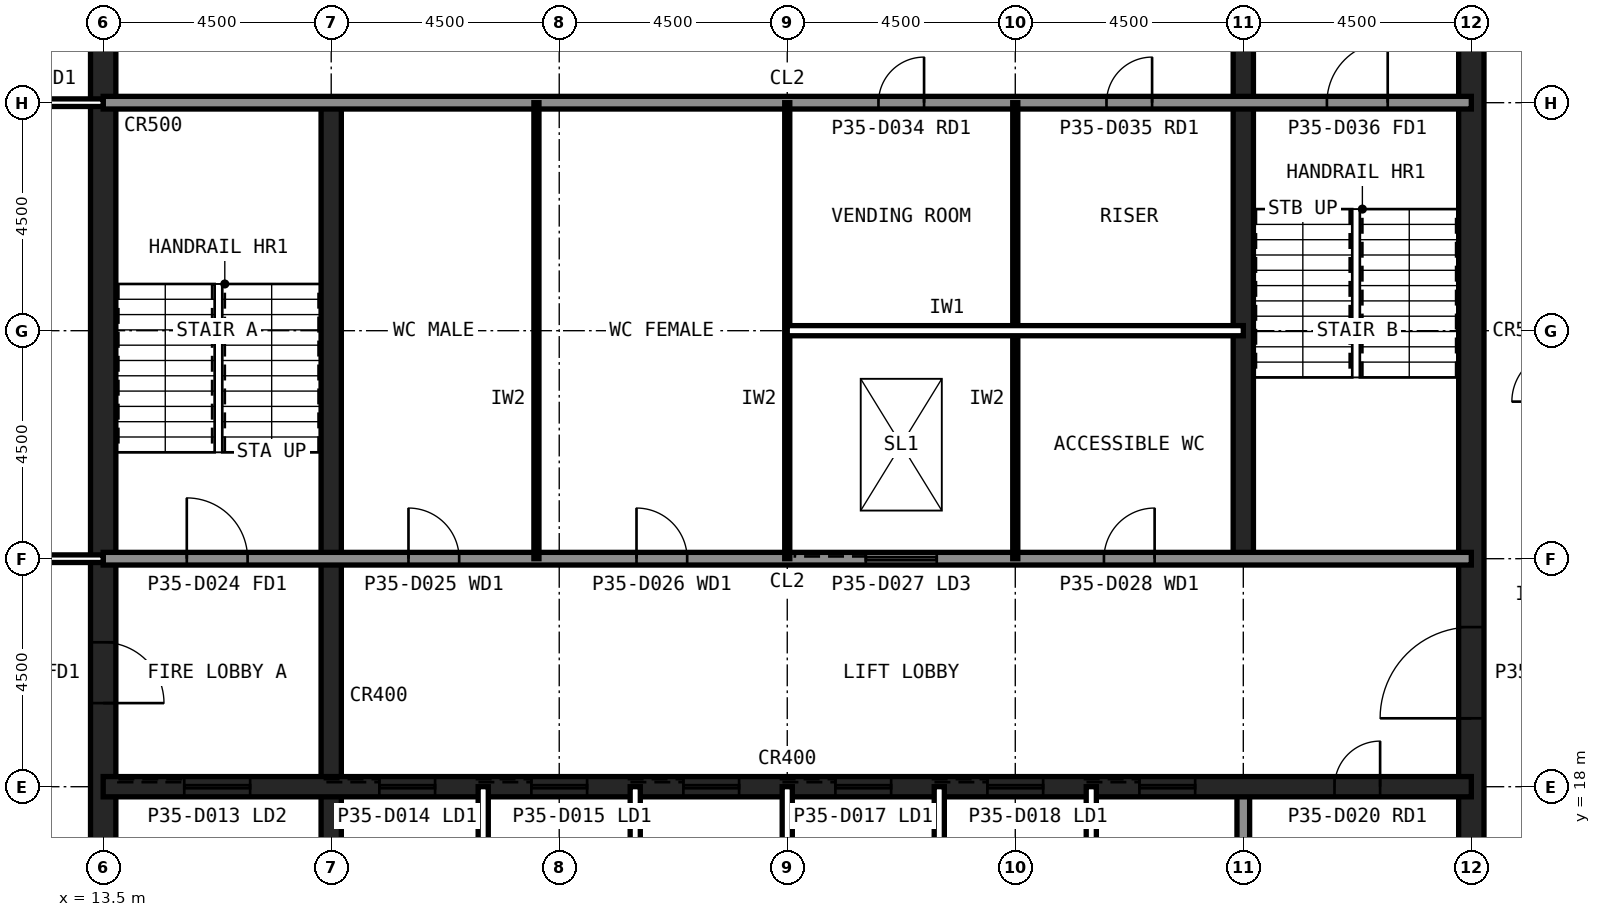
"""IFC4 building model, lengths in metres.
Left out: names, types, materials, properties, quantities, classifications, styles, units other than length and angle.
Written with IfcOpenShell. Run it as: python <this file> out.ifc"""

import sys

from ifc_helpers import new_model, si_unit, direction, frame, frame_2d, origin, place, context, subcontext, project, spatial, rectangle, extrude, element, fill, save


model = new_model("IFC4")
c1 = context("Model", 3, precision=1e-05, world=origin(), true_north=direction((0.0, 1.0)))
c2 = subcontext(c1, "Body", "Model", "MODEL_VIEW")
j1 = project(units=[si_unit("LENGTHUNIT", "METRE"), si_unit("PLANEANGLEUNIT", "RADIAN")], contexts=[c1])
p1 = place(None, origin())
s1 = spatial("IfcSite", under=j1, at=p1, CompositionType="ELEMENT")
p2 = place(p1, origin())
s2 = spatial("IfcBuilding", under=s1, at=p2, CompositionType="ELEMENT")
p3 = place(p2, frame((0.0, 0.0, 151.6)))
s3 = spatial("IfcBuildingStorey", under=s2, at=p3, CompositionType="ELEMENT", Elevation=151.6)
p4 = place(p3, frame((40.5, 13.5, 0.0), z_axis=(0.0, 0.0, 1.0), x_axis=(0.0, 1.0, 0.0)))
e1 = element("IfcWall", 1, at=p4, inside=s3, PredefinedType="SHEAR", context=c2, shape_type="SweptSolid", body=[
    extrude(rectangle(XDim=27.0, YDim=0.5, at=frame_2d((13.5, 0.0))), origin(), (0.0, 0.0, 1.0), 4.0),
])
p5 = place(p4, frame((5.85, 0.0, 0.0)))
e2 = element("IfcOpeningElement", 2, at=p5, cuts=e1, PredefinedType="OPENING", context=c2, shape_type="SweptSolid", body=[
    extrude(rectangle(XDim=1.8, YDim=2.1, at=frame_2d((0.9, 1.05))), frame((0.0, 0.26, 0.0), z_axis=(0.0, -1.0, 0.0), x_axis=(1.0, 0.0, 0.0)), (0.0, 0.0, 1.0), 0.52),
])
p6 = place(p4, frame((19.65, 0.0, 0.0)))
e3 = element("IfcOpeningElement", 3, at=p6, cuts=e1, PredefinedType="OPENING", context=c2, shape_type="SweptSolid", body=[
    extrude(rectangle(XDim=1.2, YDim=2.1, at=frame_2d((0.6, 1.05))), frame((0.0, 0.26, 0.0), z_axis=(0.0, -1.0, 0.0), x_axis=(1.0, 0.0, 0.0)), (0.0, 0.0, 1.0), 0.52),
])
p7 = place(p3, frame((13.5, 40.5, 0.0), z_axis=(0.0, 0.0, 1.0), x_axis=(0.0, -1.0, 0.0)))
e4 = element("IfcWall", 4, at=p7, inside=s3, PredefinedType="SHEAR", context=c2, shape_type="SweptSolid", body=[
    extrude(rectangle(XDim=27.0, YDim=0.5, at=frame_2d((13.5, 0.0))), origin(), (0.0, 0.0, 1.0), 4.0),
])
p8 = place(p7, frame((19.65, 0.0, 0.0)))
e5 = element("IfcOpeningElement", 5, at=p8, cuts=e4, PredefinedType="OPENING", context=c2, shape_type="SweptSolid", body=[
    extrude(rectangle(XDim=1.2, YDim=2.1, at=frame_2d((0.6, 1.05))), frame((0.0, 0.26, 0.0), z_axis=(0.0, -1.0, 0.0), x_axis=(1.0, 0.0, 0.0)), (0.0, 0.0, 1.0), 0.52),
])
p9 = place(p7, frame((5.85, 0.0, 0.0)))
e6 = element("IfcOpeningElement", 6, at=p9, cuts=e4, PredefinedType="OPENING", context=c2, shape_type="SweptSolid", body=[
    extrude(rectangle(XDim=1.8, YDim=2.1, at=frame_2d((0.9, 1.05))), frame((0.0, 0.26, 0.0), z_axis=(0.0, -1.0, 0.0), x_axis=(1.0, 0.0, 0.0)), (0.0, 0.0, 1.0), 0.52),
])
p10 = place(p3, frame((18.0, 13.5, 0.0), z_axis=(0.0, 0.0, 1.0), x_axis=(0.0, 1.0, 0.0)))
e7 = element("IfcWall", 7, at=p10, inside=s3, PredefinedType="SHEAR", context=c2, shape_type="SweptSolid", body=[
    extrude(rectangle(XDim=18.0, YDim=0.4, at=frame_2d((9.0, 0.0))), origin(), (0.0, 0.0, 1.0), 4.0),
])
p11 = place(p3, frame((36.0, 13.5, 0.0), z_axis=(0.0, 0.0, 1.0), x_axis=(0.0, 1.0, 0.0)))
e8 = element("IfcWall", 8, at=p11, inside=s3, PredefinedType="SOLIDWALL", context=c2, shape_type="SweptSolid", body=[
    extrude(rectangle(XDim=4.5, YDim=0.25, at=frame_2d((2.25, 0.0))), origin(), (0.0, 0.0, 1.0), 3.84),
])
p12 = place(p3, frame((36.0, 22.5, 0.0), z_axis=(0.0, 0.0, 1.0), x_axis=(0.0, 1.0, 0.0)))
e9 = element("IfcWall", 9, at=p12, inside=s3, PredefinedType="SHEAR", context=c2, shape_type="SweptSolid", body=[
    extrude(rectangle(XDim=18.0, YDim=0.4, at=frame_2d((9.0, 0.0))), origin(), (0.0, 0.0, 1.0), 4.0),
])
p13 = place(p3, frame((13.5, 18.0, 0.0), z_axis=(0.0, 0.0, 1.0), x_axis=(1.0, 0.0, 0.0)))
e10 = element("IfcWall", 10, at=p13, inside=s3, PredefinedType="SHEAR", context=c2, shape_type="SweptSolid", body=[
    extrude(rectangle(XDim=27.0, YDim=0.4, at=frame_2d((13.5, 0.0))), origin(), (0.0, 0.0, 1.0), 4.0),
])
p14 = place(p13, frame((24.3, 0.0, 0.0)))
e11 = element("IfcOpeningElement", 11, at=p14, cuts=e10, PredefinedType="OPENING", context=c2, shape_type="SweptSolid", body=[
    extrude(rectangle(XDim=0.9, YDim=2.1, at=frame_2d((0.45, 1.05))), frame((0.0, 0.21, 0.0), z_axis=(0.0, -1.0, 0.0), x_axis=(1.0, 0.0, 0.0)), (0.0, 0.0, 1.0), 0.42),
])
p15 = place(p13, frame((5.45, 0.0, 0.0)))
e12 = element("IfcOpeningElement", 12, at=p15, cuts=e10, PredefinedType="OPENING", context=c2, shape_type="SweptSolid", body=[
    extrude(rectangle(XDim=1.1, YDim=2.1, at=frame_2d((0.55, 1.05))), frame((0.0, 0.21, 0.0), z_axis=(0.0, -1.0, 0.0), x_axis=(1.0, 0.0, 0.0)), (0.0, 0.0, 1.0), 0.42),
])
p16 = place(p13, frame((8.45, 0.0, 0.0)))
e13 = element("IfcOpeningElement", 13, at=p16, cuts=e10, PredefinedType="OPENING", context=c2, shape_type="SweptSolid", body=[
    extrude(rectangle(XDim=1.1, YDim=2.1, at=frame_2d((0.55, 1.05))), frame((0.0, 0.21, 0.0), z_axis=(0.0, -1.0, 0.0), x_axis=(1.0, 0.0, 0.0)), (0.0, 0.0, 1.0), 0.42),
])
p17 = place(p13, frame((11.45, 0.0, 0.0)))
e14 = element("IfcOpeningElement", 14, at=p17, cuts=e10, PredefinedType="OPENING", context=c2, shape_type="SweptSolid", body=[
    extrude(rectangle(XDim=1.1, YDim=2.1, at=frame_2d((0.55, 1.05))), frame((0.0, 0.21, 0.0), z_axis=(0.0, -1.0, 0.0), x_axis=(1.0, 0.0, 0.0)), (0.0, 0.0, 1.0), 0.42),
])
p18 = place(p13, frame((14.45, 0.0, 0.0)))
e15 = element("IfcOpeningElement", 15, at=p18, cuts=e10, PredefinedType="OPENING", context=c2, shape_type="SweptSolid", body=[
    extrude(rectangle(XDim=1.1, YDim=2.1, at=frame_2d((0.55, 1.05))), frame((0.0, 0.21, 0.0), z_axis=(0.0, -1.0, 0.0), x_axis=(1.0, 0.0, 0.0)), (0.0, 0.0, 1.0), 0.42),
])
p19 = place(p13, frame((17.45, 0.0, 0.0)))
e16 = element("IfcOpeningElement", 16, at=p19, cuts=e10, PredefinedType="OPENING", context=c2, shape_type="SweptSolid", body=[
    extrude(rectangle(XDim=1.1, YDim=2.1, at=frame_2d((0.55, 1.05))), frame((0.0, 0.21, 0.0), z_axis=(0.0, -1.0, 0.0), x_axis=(1.0, 0.0, 0.0)), (0.0, 0.0, 1.0), 0.42),
])
p20 = place(p13, frame((20.45, 0.0, 0.0)))
e17 = element("IfcOpeningElement", 17, at=p20, cuts=e10, PredefinedType="OPENING", context=c2, shape_type="SweptSolid", body=[
    extrude(rectangle(XDim=1.1, YDim=2.1, at=frame_2d((0.55, 1.05))), frame((0.0, 0.21, 0.0), z_axis=(0.0, -1.0, 0.0), x_axis=(1.0, 0.0, 0.0)), (0.0, 0.0, 1.0), 0.42),
])
p21 = place(p13, frame((1.6, 0.0, 0.0)))
e18 = element("IfcOpeningElement", 18, at=p21, cuts=e10, PredefinedType="OPENING", context=c2, shape_type="SweptSolid", body=[
    extrude(rectangle(XDim=1.3, YDim=2.2, at=frame_2d((0.65, 1.1))), frame((0.0, 0.21, 0.0), z_axis=(0.0, -1.0, 0.0), x_axis=(1.0, 0.0, 0.0)), (0.0, 0.0, 1.0), 0.42),
])
p22 = place(p3, frame((13.5, 22.5, 0.0), z_axis=(0.0, 0.0, 1.0), x_axis=(1.0, 0.0, 0.0)))
e19 = element("IfcWall", 19, at=p22, inside=s3, PredefinedType="SOLIDWALL", context=c2, shape_type="SweptSolid", body=[
    extrude(rectangle(XDim=27.0, YDim=0.25, at=frame_2d((13.5, 0.0))), origin(), (0.0, 0.0, 1.0), 3.84),
])
p23 = place(p22, frame((1.65, 0.0, 0.0)))
e20 = element("IfcOpeningElement", 20, at=p23, cuts=e19, PredefinedType="OPENING", context=c2, shape_type="SweptSolid", body=[
    extrude(rectangle(XDim=1.2, YDim=2.1, at=frame_2d((0.6, 1.05))), frame((0.0, 0.135, 0.0), z_axis=(0.0, -1.0, 0.0), x_axis=(1.0, 0.0, 0.0)), (0.0, 0.0, 1.0), 0.27),
])
p24 = place(p22, frame((6.025, 0.0, 0.0)))
e21 = element("IfcOpeningElement", 21, at=p24, cuts=e19, PredefinedType="OPENING", context=c2, shape_type="SweptSolid", body=[
    extrude(rectangle(XDim=1.0, YDim=2.1, at=frame_2d((0.5, 1.05))), frame((0.0, 0.135, 0.0), z_axis=(0.0, -1.0, 0.0), x_axis=(1.0, 0.0, 0.0)), (0.0, 0.0, 1.0), 0.27),
])
p25 = place(p22, frame((10.525, 0.0, 0.0)))
e22 = element("IfcOpeningElement", 22, at=p25, cuts=e19, PredefinedType="OPENING", context=c2, shape_type="SweptSolid", body=[
    extrude(rectangle(XDim=1.0, YDim=2.1, at=frame_2d((0.5, 1.05))), frame((0.0, 0.135, 0.0), z_axis=(0.0, -1.0, 0.0), x_axis=(1.0, 0.0, 0.0)), (0.0, 0.0, 1.0), 0.27),
])
p26 = place(p22, frame((19.75, 0.0, 0.0)))
e23 = element("IfcOpeningElement", 23, at=p26, cuts=e19, PredefinedType="OPENING", context=c2, shape_type="SweptSolid", body=[
    extrude(rectangle(XDim=1.0, YDim=2.1, at=frame_2d((0.5, 1.05))), frame((0.0, 0.135, 0.0), z_axis=(0.0, -1.0, 0.0), x_axis=(1.0, 0.0, 0.0)), (0.0, 0.0, 1.0), 0.27),
])
p27 = place(p22, frame((15.05, 0.0, 0.0)))
e24 = element("IfcOpeningElement", 24, at=p27, cuts=e19, PredefinedType="OPENING", context=c2, shape_type="SweptSolid", body=[
    extrude(rectangle(XDim=1.4, YDim=2.4, at=frame_2d((0.7, 1.2))), frame((0.0, 0.135, 0.0), z_axis=(0.0, -1.0, 0.0), x_axis=(1.0, 0.0, 0.0)), (0.0, 0.0, 1.0), 0.27),
])
p28 = place(p3, frame((13.5, 31.5, 0.0), z_axis=(0.0, 0.0, 1.0), x_axis=(1.0, 0.0, 0.0)))
e25 = element("IfcWall", 25, at=p28, inside=s3, PredefinedType="SOLIDWALL", context=c2, shape_type="SweptSolid", body=[
    extrude(rectangle(XDim=27.0, YDim=0.25, at=frame_2d((13.5, 0.0))), origin(), (0.0, 0.0, 1.0), 3.84),
])
p29 = place(p28, frame((24.15, 0.0, 0.0)))
e26 = element("IfcOpeningElement", 26, at=p29, cuts=e25, PredefinedType="OPENING", context=c2, shape_type="SweptSolid", body=[
    extrude(rectangle(XDim=1.2, YDim=2.1, at=frame_2d((0.6, 1.05))), frame((0.0, 0.135, 0.0), z_axis=(0.0, -1.0, 0.0), x_axis=(1.0, 0.0, 0.0)), (0.0, 0.0, 1.0), 0.27),
])
p30 = place(p28, frame((15.3, 0.0, 0.0)))
e27 = element("IfcOpeningElement", 27, at=p30, cuts=e25, PredefinedType="OPENING", context=c2, shape_type="SweptSolid", body=[
    extrude(rectangle(XDim=0.9, YDim=2.1, at=frame_2d((0.45, 1.05))), frame((0.0, 0.135, 0.0), z_axis=(0.0, -1.0, 0.0), x_axis=(1.0, 0.0, 0.0)), (0.0, 0.0, 1.0), 0.27),
])
p31 = place(p28, frame((19.8, 0.0, 0.0)))
e28 = element("IfcOpeningElement", 28, at=p31, cuts=e25, PredefinedType="OPENING", context=c2, shape_type="SweptSolid", body=[
    extrude(rectangle(XDim=0.9, YDim=2.1, at=frame_2d((0.45, 1.05))), frame((0.0, 0.135, 0.0), z_axis=(0.0, -1.0, 0.0), x_axis=(1.0, 0.0, 0.0)), (0.0, 0.0, 1.0), 0.27),
])
for number, where, z_axis, x_axis in (
    (29, (21.0, 13.5, 0.0), (0.0, 0.0, 1.0), (0.0, 1.0, 0.0)),
    (30, (24.0, 13.5, 0.0), (0.0, 0.0, 1.0), (0.0, 1.0, 0.0)),
    (31, (27.0, 13.5, 0.0), (0.0, 0.0, 1.0), (0.0, 1.0, 0.0)),
    (32, (30.0, 13.5, 0.0), (0.0, 0.0, 1.0), (0.0, 1.0, 0.0)),
    (33, (33.0, 13.5, 0.0), (0.0, 0.0, 1.0), (0.0, 1.0, 0.0)),
):
    element("IfcWall", number, at=place(p3, frame(where, z_axis=z_axis, x_axis=x_axis)), inside=s3, PredefinedType="PARTITIONING", context=c2, shape_type="SweptSolid", body=[
        extrude(rectangle(XDim=4.5, YDim=0.2, at=frame_2d((2.25, 0.0))), origin(), (0.0, 0.0, 1.0), 3.84),
    ])
for number, where, z_axis, x_axis in (
    (34, (22.05, 22.5, 0.0), (0.0, 0.0, 1.0), (0.0, 1.0, 0.0)),
    (35, (27.0, 22.5, 0.0), (0.0, 0.0, 1.0), (0.0, 1.0, 0.0)),
    (36, (31.5, 22.5, 0.0), (0.0, 0.0, 1.0), (0.0, 1.0, 0.0)),
):
    element("IfcWall", number, at=place(p3, frame(where, z_axis=z_axis, x_axis=x_axis)), inside=s3, PredefinedType="PLUMBINGWALL", context=c2, shape_type="SweptSolid", body=[
        extrude(rectangle(XDim=9.0, YDim=0.1, at=frame_2d((4.5, 0.0))), origin(), (0.0, 0.0, 1.0), 3.84),
    ])
p32 = place(p3, frame((27.0, 27.0, 0.0), z_axis=(0.0, 0.0, 1.0), x_axis=(1.0, 0.0, 0.0)))
e37 = element("IfcWall", 37, at=p32, inside=s3, PredefinedType="PARTITIONING", context=c2, shape_type="SweptSolid", body=[
    extrude(rectangle(XDim=9.0, YDim=0.2, at=frame_2d((4.5, 0.0))), origin(), (0.0, 0.0, 1.0), 3.84),
])
p33 = place(p3, frame((9.9, 22.5, 0.0), z_axis=(0.0, 0.0, 1.0), x_axis=(1.0, 0.0, 0.0)))
e38 = element("IfcWall", 38, at=p33, inside=s3, PredefinedType="PARTITIONING", context=c2, shape_type="SweptSolid", body=[
    extrude(rectangle(XDim=3.6, YDim=0.15, at=frame_2d((1.8, 0.0))), origin(), (0.0, 0.0, 1.0), 2.989),
])
p34 = place(p3, frame((13.5, 31.5, 0.0), z_axis=(0.0, 0.0, 1.0), x_axis=(-1.0, 0.0, 0.0)))
e39 = element("IfcWall", 39, at=p34, inside=s3, PredefinedType="PARTITIONING", context=c2, shape_type="SweptSolid", body=[
    extrude(rectangle(XDim=3.6, YDim=0.15, at=frame_2d((1.8, 0.0))), origin(), (0.0, 0.0, 1.0), 2.989),
])
p35 = place(p34, frame((1.3, 0.0, 0.0)))
e40 = element("IfcOpeningElement", 40, at=p35, cuts=e39, PredefinedType="OPENING", context=c2, shape_type="SweptSolid", body=[
    extrude(rectangle(XDim=1.0, YDim=2.1, at=frame_2d((0.5, 1.05))), frame((0.0, 0.085, 0.0), z_axis=(0.0, -1.0, 0.0), x_axis=(1.0, 0.0, 0.0)), (0.0, 0.0, 1.0), 0.17),
])
p36 = place(p8, origin())
e41 = element("IfcDoor", 41, at=p36, inside=s3, OperationType="SINGLE_SWING_RIGHT", PredefinedType="DOOR", context=c2, shape_type="SweptSolid", body=[
    extrude(rectangle(XDim=1.2, YDim=2.1, at=frame_2d((0.6, 1.05))), frame((0.0, 0.025, 0.0), z_axis=(0.0, -1.0, 0.0), x_axis=(1.0, 0.0, 0.0)), (0.0, 0.0, 1.0), 0.05),
])
fill(e5, e41)
p37 = place(p5, origin())
e42 = element("IfcDoor", 42, at=p37, inside=s3, OperationType="SINGLE_SWING_LEFT", PredefinedType="DOOR", context=c2, shape_type="SweptSolid", body=[
    extrude(rectangle(XDim=1.8, YDim=2.1, at=frame_2d((0.9, 1.05))), frame((0.0, 0.025, 0.0), z_axis=(0.0, -1.0, 0.0), x_axis=(1.0, 0.0, 0.0)), (0.0, 0.0, 1.0), 0.05),
])
fill(e2, e42)
p38 = place(p23, origin())
e43 = element("IfcDoor", 43, at=p38, inside=s3, OperationType="SINGLE_SWING_LEFT", PredefinedType="DOOR", context=c2, shape_type="SweptSolid", body=[
    extrude(rectangle(XDim=1.2, YDim=2.1, at=frame_2d((0.6, 1.05))), frame((0.0, 0.025, 0.0), z_axis=(0.0, -1.0, 0.0), x_axis=(1.0, 0.0, 0.0)), (0.0, 0.0, 1.0), 0.05),
])
fill(e20, e43)
p39 = place(p29, origin())
e44 = element("IfcDoor", 44, at=p39, inside=s3, OperationType="SINGLE_SWING_RIGHT", PredefinedType="DOOR", context=c2, shape_type="SweptSolid", body=[
    extrude(rectangle(XDim=1.2, YDim=2.1, at=frame_2d((0.6, 1.05))), frame((0.0, 0.025, 0.0), z_axis=(0.0, -1.0, 0.0), x_axis=(1.0, 0.0, 0.0)), (0.0, 0.0, 1.0), 0.05),
])
fill(e26, e44)
p40 = place(p24, origin())
e45 = element("IfcDoor", 45, at=p40, inside=s3, OperationType="SINGLE_SWING_LEFT", PredefinedType="DOOR", context=c2, shape_type="SweptSolid", body=[
    extrude(rectangle(XDim=1.0, YDim=2.1, at=frame_2d((0.5, 1.05))), frame((0.0, 0.025, 0.0), z_axis=(0.0, -1.0, 0.0), x_axis=(1.0, 0.0, 0.0)), (0.0, 0.0, 1.0), 0.05),
])
fill(e21, e45)
p41 = place(p25, origin())
e46 = element("IfcDoor", 46, at=p41, inside=s3, OperationType="SINGLE_SWING_LEFT", PredefinedType="DOOR", context=c2, shape_type="SweptSolid", body=[
    extrude(rectangle(XDim=1.0, YDim=2.1, at=frame_2d((0.5, 1.05))), frame((0.0, 0.025, 0.0), z_axis=(0.0, -1.0, 0.0), x_axis=(1.0, 0.0, 0.0)), (0.0, 0.0, 1.0), 0.05),
])
fill(e22, e46)
p42 = place(p26, origin())
e47 = element("IfcDoor", 47, at=p42, inside=s3, OperationType="SINGLE_SWING_RIGHT", PredefinedType="DOOR", context=c2, shape_type="SweptSolid", body=[
    extrude(rectangle(XDim=1.0, YDim=2.1, at=frame_2d((0.5, 1.05))), frame((0.0, 0.025, 0.0), z_axis=(0.0, -1.0, 0.0), x_axis=(1.0, 0.0, 0.0)), (0.0, 0.0, 1.0), 0.05),
])
fill(e23, e47)
p43 = place(p30, origin())
e48 = element("IfcDoor", 48, at=p43, inside=s3, OperationType="SINGLE_SWING_RIGHT", PredefinedType="DOOR", context=c2, shape_type="SweptSolid", body=[
    extrude(rectangle(XDim=0.9, YDim=2.1, at=frame_2d((0.45, 1.05))), frame((0.0, 0.025, 0.0), z_axis=(0.0, -1.0, 0.0), x_axis=(1.0, 0.0, 0.0)), (0.0, 0.0, 1.0), 0.05),
])
fill(e27, e48)
p44 = place(p31, origin())
e49 = element("IfcDoor", 49, at=p44, inside=s3, OperationType="SINGLE_SWING_RIGHT", PredefinedType="DOOR", context=c2, shape_type="SweptSolid", body=[
    extrude(rectangle(XDim=0.9, YDim=2.1, at=frame_2d((0.45, 1.05))), frame((0.0, 0.025, 0.0), z_axis=(0.0, -1.0, 0.0), x_axis=(1.0, 0.0, 0.0)), (0.0, 0.0, 1.0), 0.05),
])
fill(e28, e49)
p45 = place(p14, origin())
e50 = element("IfcDoor", 50, at=p45, inside=s3, OperationType="SINGLE_SWING_RIGHT", PredefinedType="DOOR", context=c2, shape_type="SweptSolid", body=[
    extrude(rectangle(XDim=0.9, YDim=2.1, at=frame_2d((0.45, 1.05))), frame((0.0, 0.025, 0.0), z_axis=(0.0, -1.0, 0.0), x_axis=(1.0, 0.0, 0.0)), (0.0, 0.0, 1.0), 0.05),
])
fill(e11, e50)
p46 = place(p15, origin())
e51 = element("IfcDoor", 51, at=p46, inside=s3, OperationType="SLIDING_TO_LEFT", PredefinedType="DOOR", context=c2, shape_type="SweptSolid", body=[
    extrude(rectangle(XDim=1.1, YDim=2.1, at=frame_2d((0.55, 1.05))), frame((0.0, 0.025, 0.0), z_axis=(0.0, -1.0, 0.0), x_axis=(1.0, 0.0, 0.0)), (0.0, 0.0, 1.0), 0.05),
])
fill(e12, e51)
p47 = place(p16, origin())
e52 = element("IfcDoor", 52, at=p47, inside=s3, OperationType="SLIDING_TO_LEFT", PredefinedType="DOOR", context=c2, shape_type="SweptSolid", body=[
    extrude(rectangle(XDim=1.1, YDim=2.1, at=frame_2d((0.55, 1.05))), frame((0.0, 0.025, 0.0), z_axis=(0.0, -1.0, 0.0), x_axis=(1.0, 0.0, 0.0)), (0.0, 0.0, 1.0), 0.05),
])
fill(e13, e52)
p48 = place(p17, origin())
e53 = element("IfcDoor", 53, at=p48, inside=s3, OperationType="SLIDING_TO_LEFT", PredefinedType="DOOR", context=c2, shape_type="SweptSolid", body=[
    extrude(rectangle(XDim=1.1, YDim=2.1, at=frame_2d((0.55, 1.05))), frame((0.0, 0.025, 0.0), z_axis=(0.0, -1.0, 0.0), x_axis=(1.0, 0.0, 0.0)), (0.0, 0.0, 1.0), 0.05),
])
fill(e14, e53)
p49 = place(p18, origin())
e54 = element("IfcDoor", 54, at=p49, inside=s3, OperationType="SLIDING_TO_LEFT", PredefinedType="DOOR", context=c2, shape_type="SweptSolid", body=[
    extrude(rectangle(XDim=1.1, YDim=2.1, at=frame_2d((0.55, 1.05))), frame((0.0, 0.025, 0.0), z_axis=(0.0, -1.0, 0.0), x_axis=(1.0, 0.0, 0.0)), (0.0, 0.0, 1.0), 0.05),
])
fill(e15, e54)
p50 = place(p19, origin())
e55 = element("IfcDoor", 55, at=p50, inside=s3, OperationType="SLIDING_TO_LEFT", PredefinedType="DOOR", context=c2, shape_type="SweptSolid", body=[
    extrude(rectangle(XDim=1.1, YDim=2.1, at=frame_2d((0.55, 1.05))), frame((0.0, 0.025, 0.0), z_axis=(0.0, -1.0, 0.0), x_axis=(1.0, 0.0, 0.0)), (0.0, 0.0, 1.0), 0.05),
])
fill(e16, e55)
p51 = place(p20, origin())
e56 = element("IfcDoor", 56, at=p51, inside=s3, OperationType="SLIDING_TO_LEFT", PredefinedType="DOOR", context=c2, shape_type="SweptSolid", body=[
    extrude(rectangle(XDim=1.1, YDim=2.1, at=frame_2d((0.55, 1.05))), frame((0.0, 0.025, 0.0), z_axis=(0.0, -1.0, 0.0), x_axis=(1.0, 0.0, 0.0)), (0.0, 0.0, 1.0), 0.05),
])
fill(e17, e56)
p52 = place(p21, origin())
e57 = element("IfcDoor", 57, at=p52, inside=s3, OperationType="SLIDING_TO_LEFT", PredefinedType="DOOR", context=c2, shape_type="SweptSolid", body=[
    extrude(rectangle(XDim=1.3, YDim=2.2, at=frame_2d((0.65, 1.1))), frame((0.0, 0.025, 0.0), z_axis=(0.0, -1.0, 0.0), x_axis=(1.0, 0.0, 0.0)), (0.0, 0.0, 1.0), 0.05),
])
fill(e18, e57)
p53 = place(p27, origin())
e58 = element("IfcDoor", 58, at=p53, inside=s3, OperationType="SLIDING_TO_LEFT", PredefinedType="DOOR", context=c2, shape_type="SweptSolid", body=[
    extrude(rectangle(XDim=1.4, YDim=2.4, at=frame_2d((0.7, 1.2))), frame((0.0, 0.025, 0.0), z_axis=(0.0, -1.0, 0.0), x_axis=(1.0, 0.0, 0.0)), (0.0, 0.0, 1.0), 0.05),
])
fill(e24, e58)
save(model, sys.argv[1])
